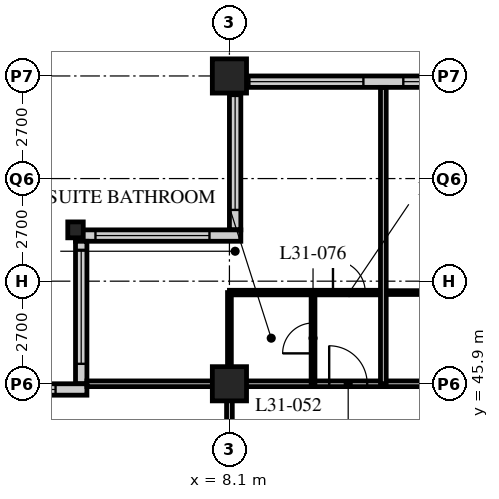
"""IFC4 building model, lengths in metres.
Left out: names, types, materials, properties, quantities, classifications, styles, units other than length and angle.
Written with IfcOpenShell. Run it as: python <this file> out.ifc"""

import sys

from ifc_helpers import new_model, si_unit, direction, frame, frame_2d, origin, origin_2d, place, context, subcontext, project, spatial, rectangle, hollow_rectangle, i_section, extrude, element, fill, save


model = new_model("IFC4")
c1 = context("Model", 3, precision=1e-05, world=origin(), true_north=direction((0.0, 1.0)))
c2 = subcontext(c1, "Body", "Model", "MODEL_VIEW")
j1 = project(units=[si_unit("LENGTHUNIT", "METRE"), si_unit("PLANEANGLEUNIT", "RADIAN")], contexts=[c1])
p1 = place(None, origin())
s1 = spatial("IfcSite", under=j1, at=p1, CompositionType="ELEMENT")
p2 = place(p1, origin())
s2 = spatial("IfcBuilding", under=s1, at=p2, CompositionType="ELEMENT")
p3 = place(p2, frame((0.0, 0.0, 123.8)))
s3 = spatial("IfcBuildingStorey", under=s2, at=p3, CompositionType="ELEMENT", Elevation=123.8)
p4 = place(p3, frame((4.05, 49.95, 0.0), z_axis=(0.0, 0.0, 1.0), x_axis=(1.0, 0.0, 0.0)))
e1 = element("IfcColumn", 1, at=p4, inside=s3, PredefinedType="COLUMN", context=c2, shape_type="SweptSolid", body=[
    extrude(i_section(OverallWidth=0.407, OverallDepth=0.419, WebThickness=0.031, FlangeThickness=0.049, FilletRadius=0.015, at=origin_2d()), origin(), (0.0, 0.0, 1.0), 3.4),
])
for number, where, z_axis, x_axis in (
    (2, (8.1, 45.9, 0.0), (0.0, 0.0, 1.0), (1.0, 0.0, 0.0)),
    (3, (8.1, 54.0, 0.0), (0.0, 0.0, 1.0), (1.0, 0.0, 0.0)),
):
    element("IfcColumn", number, at=place(p3, frame(where, z_axis=z_axis, x_axis=x_axis)), inside=s3, PredefinedType="COLUMN", context=c2, shape_type="SweptSolid", body=[
        extrude(hollow_rectangle(XDim=0.9, YDim=0.9, WallThickness=0.09, at=origin_2d()), origin(), (0.0, 0.0, 1.0), 3.4),
    ])
p5 = place(p3, frame((48.3, 53.85, 0.0), z_axis=(0.0, 0.0, 1.0), x_axis=(-1.0, 0.0, 0.0)))
e4 = element("IfcWall", 4, at=p5, inside=s3, PredefinedType="SOLIDWALL", context=c2, shape_type="SweptSolid", body=[
    extrude(rectangle(XDim=40.2, YDim=0.3, at=frame_2d((20.1, 0.0))), origin(), (0.0, 0.0, 1.0), 3.19),
])
p6 = place(p5, frame((0.225, 0.0, 0.9)))
e5 = element("IfcOpeningElement", 5, at=p6, cuts=e4, PredefinedType="OPENING", context=c2, shape_type="SweptSolid", body=[
    extrude(rectangle(XDim=3.0, YDim=2.0, at=frame_2d((1.5, 1.0))), frame((0.0, 0.16, 0.0), z_axis=(0.0, -1.0, 0.0), x_axis=(1.0, 0.0, 0.0)), (0.0, 0.0, 1.0), 0.32),
])
p7 = place(p5, frame((4.275, 0.0, 0.9)))
e6 = element("IfcOpeningElement", 6, at=p7, cuts=e4, PredefinedType="OPENING", context=c2, shape_type="SweptSolid", body=[
    extrude(rectangle(XDim=3.0, YDim=2.0, at=frame_2d((1.5, 1.0))), frame((0.0, 0.16, 0.0), z_axis=(0.0, -1.0, 0.0), x_axis=(1.0, 0.0, 0.0)), (0.0, 0.0, 1.0), 0.32),
])
p8 = place(p5, frame((8.325, 0.0, 0.9)))
e7 = element("IfcOpeningElement", 7, at=p8, cuts=e4, PredefinedType="OPENING", context=c2, shape_type="SweptSolid", body=[
    extrude(rectangle(XDim=3.0, YDim=2.0, at=frame_2d((1.5, 1.0))), frame((0.0, 0.16, 0.0), z_axis=(0.0, -1.0, 0.0), x_axis=(1.0, 0.0, 0.0)), (0.0, 0.0, 1.0), 0.32),
])
p9 = place(p5, frame((12.375, 0.0, 0.9)))
e8 = element("IfcOpeningElement", 8, at=p9, cuts=e4, PredefinedType="OPENING", context=c2, shape_type="SweptSolid", body=[
    extrude(rectangle(XDim=3.0, YDim=2.0, at=frame_2d((1.5, 1.0))), frame((0.0, 0.16, 0.0), z_axis=(0.0, -1.0, 0.0), x_axis=(1.0, 0.0, 0.0)), (0.0, 0.0, 1.0), 0.32),
])
p10 = place(p5, frame((16.425, 0.0, 0.9)))
e9 = element("IfcOpeningElement", 9, at=p10, cuts=e4, PredefinedType="OPENING", context=c2, shape_type="SweptSolid", body=[
    extrude(rectangle(XDim=3.0, YDim=2.0, at=frame_2d((1.5, 1.0))), frame((0.0, 0.16, 0.0), z_axis=(0.0, -1.0, 0.0), x_axis=(1.0, 0.0, 0.0)), (0.0, 0.0, 1.0), 0.32),
])
p11 = place(p5, frame((20.475, 0.0, 0.9)))
e10 = element("IfcOpeningElement", 10, at=p11, cuts=e4, PredefinedType="OPENING", context=c2, shape_type="SweptSolid", body=[
    extrude(rectangle(XDim=3.0, YDim=2.0, at=frame_2d((1.5, 1.0))), frame((0.0, 0.16, 0.0), z_axis=(0.0, -1.0, 0.0), x_axis=(1.0, 0.0, 0.0)), (0.0, 0.0, 1.0), 0.32),
])
p12 = place(p5, frame((24.525, 0.0, 0.9)))
e11 = element("IfcOpeningElement", 11, at=p12, cuts=e4, PredefinedType="OPENING", context=c2, shape_type="SweptSolid", body=[
    extrude(rectangle(XDim=3.0, YDim=2.0, at=frame_2d((1.5, 1.0))), frame((0.0, 0.16, 0.0), z_axis=(0.0, -1.0, 0.0), x_axis=(1.0, 0.0, 0.0)), (0.0, 0.0, 1.0), 0.32),
])
p13 = place(p5, frame((28.575, 0.0, 0.9)))
e12 = element("IfcOpeningElement", 12, at=p13, cuts=e4, PredefinedType="OPENING", context=c2, shape_type="SweptSolid", body=[
    extrude(rectangle(XDim=3.0, YDim=2.0, at=frame_2d((1.5, 1.0))), frame((0.0, 0.16, 0.0), z_axis=(0.0, -1.0, 0.0), x_axis=(1.0, 0.0, 0.0)), (0.0, 0.0, 1.0), 0.32),
])
p14 = place(p5, frame((32.625, 0.0, 0.9)))
e13 = element("IfcOpeningElement", 13, at=p14, cuts=e4, PredefinedType="OPENING", context=c2, shape_type="SweptSolid", body=[
    extrude(rectangle(XDim=3.0, YDim=2.0, at=frame_2d((1.5, 1.0))), frame((0.0, 0.16, 0.0), z_axis=(0.0, -1.0, 0.0), x_axis=(1.0, 0.0, 0.0)), (0.0, 0.0, 1.0), 0.32),
])
p15 = place(p5, frame((36.675, 0.0, 0.9)))
e14 = element("IfcOpeningElement", 14, at=p15, cuts=e4, PredefinedType="OPENING", context=c2, shape_type="SweptSolid", body=[
    extrude(rectangle(XDim=3.0, YDim=2.0, at=frame_2d((1.5, 1.0))), frame((0.0, 0.16, 0.0), z_axis=(0.0, -1.0, 0.0), x_axis=(1.0, 0.0, 0.0)), (0.0, 0.0, 1.0), 0.32),
])
p16 = place(p3, frame((8.25, 53.7, 0.0), z_axis=(0.0, 0.0, 1.0), x_axis=(0.0, -1.0, 0.0)))
e15 = element("IfcWall", 15, at=p16, inside=s3, PredefinedType="SOLIDWALL", context=c2, shape_type="SweptSolid", body=[
    extrude(rectangle(XDim=3.75, YDim=0.3, at=frame_2d((1.875, 0.0))), origin(), (0.0, 0.0, 1.0), 3.19),
])
p17 = place(p16, frame((0.225, 0.0, 0.9)))
e16 = element("IfcOpeningElement", 16, at=p17, cuts=e15, PredefinedType="OPENING", context=c2, shape_type="SweptSolid", body=[
    extrude(rectangle(XDim=3.0, YDim=1.5, at=frame_2d((1.5, 0.75))), frame((0.0, 0.16, 0.0), z_axis=(0.0, -1.0, 0.0), x_axis=(1.0, 0.0, 0.0)), (0.0, 0.0, 1.0), 0.32),
])
p18 = place(p3, frame((8.4, 49.8, 0.0), z_axis=(0.0, 0.0, 1.0), x_axis=(-1.0, 0.0, 0.0)))
e17 = element("IfcWall", 17, at=p18, inside=s3, PredefinedType="SOLIDWALL", context=c2, shape_type="SweptSolid", body=[
    extrude(rectangle(XDim=4.35, YDim=0.3, at=frame_2d((2.175, 0.0))), origin(), (0.0, 0.0, 1.0), 3.19),
])
p19 = place(p18, frame((0.825, 0.0, 0.9)))
e18 = element("IfcOpeningElement", 18, at=p19, cuts=e17, PredefinedType="OPENING", context=c2, shape_type="SweptSolid", body=[
    extrude(rectangle(XDim=3.0, YDim=1.5, at=frame_2d((1.5, 0.75))), frame((0.0, 0.16, 0.0), z_axis=(0.0, -1.0, 0.0), x_axis=(1.0, 0.0, 0.0)), (0.0, 0.0, 1.0), 0.32),
])
p20 = place(p3, frame((4.2, 49.65, 0.0), z_axis=(0.0, 0.0, 1.0), x_axis=(0.0, -1.0, 0.0)))
e19 = element("IfcWall", 19, at=p20, inside=s3, PredefinedType="SOLIDWALL", context=c2, shape_type="SweptSolid", body=[
    extrude(rectangle(XDim=3.75, YDim=0.3, at=frame_2d((1.875, 0.0))), origin(), (0.0, 0.0, 1.0), 3.19),
])
p21 = place(p20, frame((0.225, 0.0, 0.9)))
e20 = element("IfcOpeningElement", 20, at=p21, cuts=e19, PredefinedType="OPENING", context=c2, shape_type="SweptSolid", body=[
    extrude(rectangle(XDim=3.0, YDim=1.5, at=frame_2d((1.5, 0.75))), frame((0.0, 0.16, 0.0), z_axis=(0.0, -1.0, 0.0), x_axis=(1.0, 0.0, 0.0)), (0.0, 0.0, 1.0), 0.32),
])
p22 = place(p3, frame((4.35, 45.75, 0.0), z_axis=(0.0, 0.0, 1.0), x_axis=(-1.0, 0.0, 0.0)))
e21 = element("IfcWall", 21, at=p22, inside=s3, PredefinedType="SOLIDWALL", context=c2, shape_type="SweptSolid", body=[
    extrude(rectangle(XDim=4.35, YDim=0.3, at=frame_2d((2.175, 0.0))), origin(), (0.0, 0.0, 1.0), 3.19),
])
p23 = place(p22, frame((0.825, 0.0, 0.9)))
e22 = element("IfcOpeningElement", 22, at=p23, cuts=e21, PredefinedType="OPENING", context=c2, shape_type="SweptSolid", body=[
    extrude(rectangle(XDim=3.0, YDim=1.5, at=frame_2d((1.5, 0.75))), frame((0.0, 0.16, 0.0), z_axis=(0.0, -1.0, 0.0), x_axis=(1.0, 0.0, 0.0)), (0.0, 0.0, 1.0), 0.32),
])
p24 = place(p3, frame((8.1, 45.9, 0.0), z_axis=(0.0, 0.0, 1.0), x_axis=(1.0, 0.0, 0.0)))
e23 = element("IfcWall", 23, at=p24, inside=s3, PredefinedType="PARTITIONING", context=c2, shape_type="SweptSolid", body=[
    extrude(rectangle(XDim=40.5, YDim=0.15, at=frame_2d((20.25, 0.0))), origin(), (0.0, 0.0, 1.0), 2.578),
])
p25 = place(p24, frame((9.625, 0.0, 0.0)))
e24 = element("IfcOpeningElement", 24, at=p25, cuts=e23, PredefinedType="OPENING", context=c2, shape_type="SweptSolid", body=[
    extrude(rectangle(XDim=1.0, YDim=2.1, at=frame_2d((0.5, 1.05))), frame((0.0, 0.085, 0.0), z_axis=(0.0, -1.0, 0.0), x_axis=(1.0, 0.0, 0.0)), (0.0, 0.0, 1.0), 0.17),
])
p26 = place(p24, frame((21.65, 0.0, 0.0)))
e25 = element("IfcOpeningElement", 25, at=p26, cuts=e23, PredefinedType="OPENING", context=c2, shape_type="SweptSolid", body=[
    extrude(rectangle(XDim=1.0, YDim=2.1, at=frame_2d((0.5, 1.05))), frame((0.0, 0.085, 0.0), z_axis=(0.0, -1.0, 0.0), x_axis=(1.0, 0.0, 0.0)), (0.0, 0.0, 1.0), 0.17),
])
p27 = place(p24, frame((26.75, 0.0, 0.0)))
e26 = element("IfcOpeningElement", 26, at=p27, cuts=e23, PredefinedType="OPENING", context=c2, shape_type="SweptSolid", body=[
    extrude(rectangle(XDim=1.0, YDim=2.1, at=frame_2d((0.5, 1.05))), frame((0.0, 0.085, 0.0), z_axis=(0.0, -1.0, 0.0), x_axis=(1.0, 0.0, 0.0)), (0.0, 0.0, 1.0), 0.17),
])
p28 = place(p24, frame((28.95, 0.0, 0.0)))
e27 = element("IfcOpeningElement", 27, at=p28, cuts=e23, PredefinedType="OPENING", context=c2, shape_type="SweptSolid", body=[
    extrude(rectangle(XDim=1.0, YDim=2.1, at=frame_2d((0.5, 1.05))), frame((0.0, 0.085, 0.0), z_axis=(0.0, -1.0, 0.0), x_axis=(1.0, 0.0, 0.0)), (0.0, 0.0, 1.0), 0.17),
])
p29 = place(p24, frame((34.85, 0.0, 0.0)))
e28 = element("IfcOpeningElement", 28, at=p29, cuts=e23, PredefinedType="OPENING", context=c2, shape_type="SweptSolid", body=[
    extrude(rectangle(XDim=1.0, YDim=2.1, at=frame_2d((0.5, 1.05))), frame((0.0, 0.085, 0.0), z_axis=(0.0, -1.0, 0.0), x_axis=(1.0, 0.0, 0.0)), (0.0, 0.0, 1.0), 0.17),
])
p30 = place(p24, frame((36.875, 0.0, 0.0)))
e29 = element("IfcOpeningElement", 29, at=p30, cuts=e23, PredefinedType="OPENING", context=c2, shape_type="SweptSolid", body=[
    extrude(rectangle(XDim=1.0, YDim=2.1, at=frame_2d((0.5, 1.05))), frame((0.0, 0.085, 0.0), z_axis=(0.0, -1.0, 0.0), x_axis=(1.0, 0.0, 0.0)), (0.0, 0.0, 1.0), 0.17),
])
p31 = place(p24, frame((2.625, 0.0, 0.0)))
e30 = element("IfcOpeningElement", 30, at=p31, cuts=e23, PredefinedType="OPENING", context=c2, shape_type="SweptSolid", body=[
    extrude(rectangle(XDim=1.0, YDim=2.1, at=frame_2d((0.5, 1.05))), frame((0.0, 0.085, 0.0), z_axis=(0.0, -1.0, 0.0), x_axis=(1.0, 0.0, 0.0)), (0.0, 0.0, 1.0), 0.17),
])
p32 = place(p3, frame((8.1, 21.6, 0.0), z_axis=(0.0, 0.0, 1.0), x_axis=(0.0, 1.0, 0.0)))
e31 = element("IfcWall", 31, at=p32, inside=s3, PredefinedType="PARTITIONING", context=c2, shape_type="SweptSolid", body=[
    extrude(rectangle(XDim=24.3, YDim=0.15, at=frame_2d((12.15, 0.0))), origin(), (0.0, 0.0, 1.0), 2.578),
])
p33 = place(p32, frame((5.45, 0.0, 0.0)))
e32 = element("IfcOpeningElement", 32, at=p33, cuts=e31, PredefinedType="OPENING", context=c2, shape_type="SweptSolid", body=[
    extrude(rectangle(XDim=1.0, YDim=2.1, at=frame_2d((0.5, 1.05))), frame((0.0, 0.085, 0.0), z_axis=(0.0, -1.0, 0.0), x_axis=(1.0, 0.0, 0.0)), (0.0, 0.0, 1.0), 0.17),
])
p34 = place(p32, frame((10.0, 0.0, 0.0)))
e33 = element("IfcOpeningElement", 33, at=p34, cuts=e31, PredefinedType="OPENING", context=c2, shape_type="SweptSolid", body=[
    extrude(rectangle(XDim=1.0, YDim=2.1, at=frame_2d((0.5, 1.05))), frame((0.0, 0.085, 0.0), z_axis=(0.0, -1.0, 0.0), x_axis=(1.0, 0.0, 0.0)), (0.0, 0.0, 1.0), 0.17),
])
p35 = place(p32, frame((21.65, 0.0, 0.0)))
e34 = element("IfcOpeningElement", 34, at=p35, cuts=e31, PredefinedType="OPENING", context=c2, shape_type="SweptSolid", body=[
    extrude(rectangle(XDim=1.0, YDim=2.1, at=frame_2d((0.5, 1.05))), frame((0.0, 0.085, 0.0), z_axis=(0.0, -1.0, 0.0), x_axis=(1.0, 0.0, 0.0)), (0.0, 0.0, 1.0), 0.17),
])
p36 = place(p3, frame((12.15, 48.3, 0.0), z_axis=(0.0, 0.0, 1.0), x_axis=(1.0, 0.0, 0.0)))
e35 = element("IfcWall", 35, at=p36, inside=s3, PredefinedType="PARTITIONING", context=c2, shape_type="SweptSolid", body=[
    extrude(rectangle(XDim=2.6, YDim=0.1, at=frame_2d((1.3, 0.0))), origin(), (0.0, 0.0, 1.0), 3.19),
])
p37 = place(p3, frame((8.1, 48.3, 0.0), z_axis=(0.0, 0.0, 1.0), x_axis=(1.0, 0.0, 0.0)))
e36 = element("IfcWall", 36, at=p37, inside=s3, PredefinedType="PARTITIONING", context=c2, shape_type="SweptSolid", body=[
    extrude(rectangle(XDim=4.05, YDim=0.12, at=frame_2d((2.025, 0.0))), origin(), (0.0, 0.0, 1.0), 3.19),
])
p38 = place(p37, frame((2.725, 0.0, 0.0)))
e37 = element("IfcOpeningElement", 37, at=p38, cuts=e36, PredefinedType="OPENING", context=c2, shape_type="SweptSolid", body=[
    extrude(rectangle(XDim=0.85, YDim=2.1, at=frame_2d((0.425, 1.05))), frame((0.0, 0.07, 0.0), z_axis=(0.0, -1.0, 0.0), x_axis=(1.0, 0.0, 0.0)), (0.0, 0.0, 1.0), 0.14),
])
p39 = place(p3, frame((10.3, 45.9, 0.0), z_axis=(0.0, 0.0, 1.0), x_axis=(0.0, 1.0, 0.0)))
e38 = element("IfcWall", 38, at=p39, inside=s3, PredefinedType="PARTITIONING", context=c2, shape_type="SweptSolid", body=[
    extrude(rectangle(XDim=2.4, YDim=0.1, at=frame_2d((1.2, 0.0))), origin(), (0.0, 0.0, 1.0), 3.19),
])
p40 = place(p39, frame((0.8, 0.0, 0.0)))
e39 = element("IfcOpeningElement", 39, at=p40, cuts=e38, PredefinedType="OPENING", context=c2, shape_type="SweptSolid", body=[
    extrude(rectangle(XDim=0.8, YDim=2.1, at=frame_2d((0.4, 1.05))), frame((0.0, 0.06, 0.0), z_axis=(0.0, -1.0, 0.0), x_axis=(1.0, 0.0, 0.0)), (0.0, 0.0, 1.0), 0.12),
])
p41 = place(p3, frame((8.1, 45.9, 0.0), z_axis=(0.0, 0.0, 1.0), x_axis=(0.0, 1.0, 0.0)))
e40 = element("IfcWall", 40, at=p41, inside=s3, PredefinedType="PARTITIONING", context=c2, shape_type="SweptSolid", body=[
    extrude(rectangle(XDim=2.4, YDim=0.1, at=frame_2d((1.2, 0.0))), origin(), (0.0, 0.0, 1.0), 2.578),
])
p42 = place(p3, frame((4.35, 45.9, 0.0), z_axis=(0.0, 0.0, 1.0), x_axis=(1.0, 0.0, 0.0)))
e41 = element("IfcWall", 41, at=p42, inside=s3, PredefinedType="PARTITIONING", context=c2, shape_type="SweptSolid", body=[
    extrude(rectangle(XDim=3.75, YDim=0.15, at=frame_2d((1.875, 0.0))), origin(), (0.0, 0.0, 1.0), 2.578),
])
p43 = place(p3, frame((12.15, 45.9, 0.0), z_axis=(0.0, 0.0, 1.0), x_axis=(0.0, 1.0, 0.0)))
e42 = element("IfcWall", 42, at=p43, inside=s3, PredefinedType="PARTITIONING", context=c2, shape_type="SweptSolid", body=[
    extrude(rectangle(XDim=7.8, YDim=0.15, at=frame_2d((3.9, 0.0))), origin(), (0.0, 0.0, 1.0), 3.19),
])
p44 = place(p14, origin())
e43 = element("IfcWindow", 43, at=p44, inside=s3, PartitioningType="SINGLE_PANEL", PredefinedType="WINDOW", context=c2, shape_type="SweptSolid", body=[
    extrude(rectangle(XDim=3.0, YDim=2.0, at=frame_2d((1.5, 1.0))), frame((0.0, 0.03, 0.0), z_axis=(0.0, -1.0, 0.0), x_axis=(1.0, 0.0, 0.0)), (0.0, 0.0, 1.0), 0.06),
])
fill(e13, e43)
p45 = place(p15, origin())
e44 = element("IfcWindow", 44, at=p45, inside=s3, PartitioningType="SINGLE_PANEL", PredefinedType="WINDOW", context=c2, shape_type="SweptSolid", body=[
    extrude(rectangle(XDim=3.0, YDim=2.0, at=frame_2d((1.5, 1.0))), frame((0.0, 0.03, 0.0), z_axis=(0.0, -1.0, 0.0), x_axis=(1.0, 0.0, 0.0)), (0.0, 0.0, 1.0), 0.06),
])
fill(e14, e44)
p46 = place(p17, origin())
e45 = element("IfcWindow", 45, at=p46, inside=s3, PartitioningType="SINGLE_PANEL", PredefinedType="WINDOW", context=c2, shape_type="SweptSolid", body=[
    extrude(rectangle(XDim=3.0, YDim=1.5, at=frame_2d((1.5, 0.75))), frame((0.0, 0.03, 0.0), z_axis=(0.0, -1.0, 0.0), x_axis=(1.0, 0.0, 0.0)), (0.0, 0.0, 1.0), 0.06),
])
fill(e16, e45)
p47 = place(p19, origin())
e46 = element("IfcWindow", 46, at=p47, inside=s3, PartitioningType="SINGLE_PANEL", PredefinedType="WINDOW", context=c2, shape_type="SweptSolid", body=[
    extrude(rectangle(XDim=3.0, YDim=1.5, at=frame_2d((1.5, 0.75))), frame((0.0, 0.03, 0.0), z_axis=(0.0, -1.0, 0.0), x_axis=(1.0, 0.0, 0.0)), (0.0, 0.0, 1.0), 0.06),
])
fill(e18, e46)
p48 = place(p21, origin())
e47 = element("IfcWindow", 47, at=p48, inside=s3, PartitioningType="SINGLE_PANEL", PredefinedType="WINDOW", context=c2, shape_type="SweptSolid", body=[
    extrude(rectangle(XDim=3.0, YDim=1.5, at=frame_2d((1.5, 0.75))), frame((0.0, 0.03, 0.0), z_axis=(0.0, -1.0, 0.0), x_axis=(1.0, 0.0, 0.0)), (0.0, 0.0, 1.0), 0.06),
])
fill(e20, e47)
p49 = place(p23, origin())
e48 = element("IfcWindow", 48, at=p49, inside=s3, PartitioningType="SINGLE_PANEL", PredefinedType="WINDOW", context=c2, shape_type="SweptSolid", body=[
    extrude(rectangle(XDim=3.0, YDim=1.5, at=frame_2d((1.5, 0.75))), frame((0.0, 0.03, 0.0), z_axis=(0.0, -1.0, 0.0), x_axis=(1.0, 0.0, 0.0)), (0.0, 0.0, 1.0), 0.06),
])
fill(e22, e48)
p50 = place(p40, origin())
e49 = element("IfcDoor", 49, at=p50, inside=s3, OperationType="SINGLE_SWING_LEFT", PredefinedType="DOOR", context=c2, shape_type="SweptSolid", body=[
    extrude(rectangle(XDim=0.8, YDim=2.1, at=frame_2d((0.4, 1.05))), frame((0.0, 0.025, 0.0), z_axis=(0.0, -1.0, 0.0), x_axis=(1.0, 0.0, 0.0)), (0.0, 0.0, 1.0), 0.05),
])
fill(e39, e49)
p51 = place(p31, origin())
e50 = element("IfcDoor", 50, at=p51, inside=s3, OperationType="SINGLE_SWING_LEFT", PredefinedType="DOOR", context=c2, shape_type="SweptSolid", body=[
    extrude(rectangle(XDim=1.0, YDim=2.1, at=frame_2d((0.5, 1.05))), frame((0.0, 0.025, 0.0), z_axis=(0.0, -1.0, 0.0), x_axis=(1.0, 0.0, 0.0)), (0.0, 0.0, 1.0), 0.05),
])
fill(e30, e50)
p52 = place(p38, origin())
e51 = element("IfcDoor", 51, at=p52, inside=s3, OperationType="SINGLE_SWING_LEFT", PredefinedType="DOOR", context=c2, shape_type="SweptSolid", body=[
    extrude(rectangle(XDim=0.85, YDim=2.1, at=frame_2d((0.425, 1.05))), frame((0.0, 0.025, 0.0), z_axis=(0.0, -1.0, 0.0), x_axis=(1.0, 0.0, 0.0)), (0.0, 0.0, 1.0), 0.05),
])
fill(e37, e51)
save(model, sys.argv[1])
